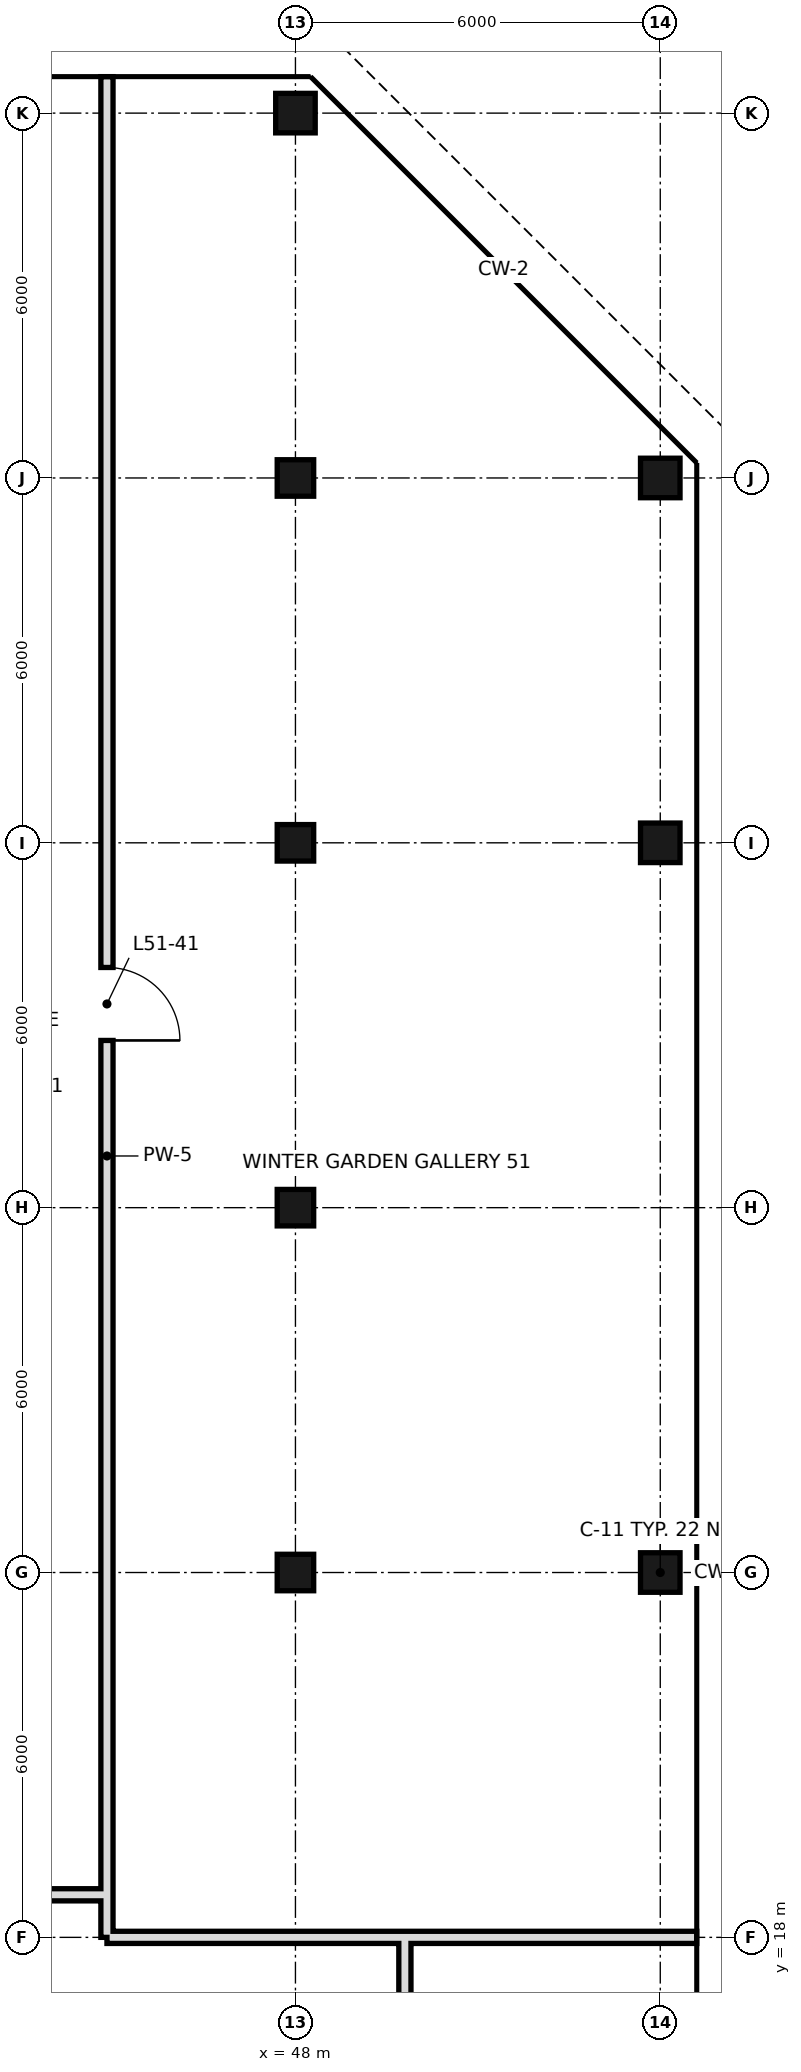
"""IFC4 building model, lengths in metres.
Left out: names, types, materials, properties, quantities, classifications, styles, units other than length and angle.
Written with IfcOpenShell. Run it as: python <this file> out.ifc"""

import sys

from ifc_helpers import new_model, si_unit, direction, frame, frame_2d, origin, origin_2d, place, context, subcontext, project, spatial, rectangle, hollow_rectangle, extrude, element, fill, save


model = new_model("IFC4")
c1 = context("Model", 3, precision=1e-05, world=origin(), true_north=direction((0.0, 1.0)))
c2 = subcontext(c1, "Body", "Model", "MODEL_VIEW")
j1 = project(units=[si_unit("LENGTHUNIT", "METRE"), si_unit("PLANEANGLEUNIT", "RADIAN")], contexts=[c1])
p1 = place(None, origin())
s1 = spatial("IfcSite", under=j1, at=p1, CompositionType="ELEMENT")
p2 = place(p1, origin())
s2 = spatial("IfcBuilding", under=s1, at=p2, CompositionType="ELEMENT")
p3 = place(p2, frame((0.0, 0.0, 219.0)))
s3 = spatial("IfcBuildingStorey", under=s2, at=p3, CompositionType="ELEMENT", Elevation=219.0)
for number, where, z_axis, x_axis in (
    (1, (48.0, 24.0, 0.0), (0.0, 0.0, 1.0), (1.0, 0.0, 0.0)),
    (2, (48.0, 30.0, 0.0), (0.0, 0.0, 1.0), (1.0, 0.0, 0.0)),
    (3, (48.0, 36.0, 0.0), (0.0, 0.0, 1.0), (1.0, 0.0, 0.0)),
    (4, (48.0, 42.0, 0.0), (0.0, 0.0, 1.0), (1.0, 0.0, 0.0)),
):
    element("IfcColumn", number, at=place(p3, frame(where, z_axis=z_axis, x_axis=x_axis)), inside=s3, PredefinedType="COLUMN", context=c2, shape_type="SweptSolid", body=[
        extrude(hollow_rectangle(XDim=0.6, YDim=0.6, WallThickness=0.028, at=origin_2d()), origin(), (0.0, 0.0, 1.0), 3.6),
    ])
for number, where, z_axis, x_axis in (
    (5, (48.0, 48.0, 0.0), (0.0, 0.0, 1.0), (1.0, 0.0, 0.0)),
    (6, (54.0, 24.0, 0.0), (0.0, 0.0, 1.0), (1.0, 0.0, 0.0)),
    (7, (54.0, 36.0, 0.0), (0.0, 0.0, 1.0), (1.0, 0.0, 0.0)),
    (8, (54.0, 42.0, 0.0), (0.0, 0.0, 1.0), (1.0, 0.0, 0.0)),
):
    element("IfcColumn", number, at=place(p3, frame(where, z_axis=z_axis, x_axis=x_axis)), inside=s3, PredefinedType="COLUMN", context=c2, shape_type="SweptSolid", body=[
        extrude(hollow_rectangle(XDim=0.65, YDim=0.65, WallThickness=0.032, at=origin_2d()), origin(), (0.0, 0.0, 1.0), 3.6),
    ])
p4 = place(p3, frame((44.9, 18.0, 0.0), z_axis=(0.0, 0.0, 1.0), x_axis=(0.0, 1.0, 0.0)))
e9 = element("IfcWall", 9, at=p4, inside=s3, PredefinedType="SOLIDWALL", context=c2, shape_type="SweptSolid", body=[
    extrude(rectangle(XDim=30.6, YDim=0.2, at=frame_2d((15.3, 0.0))), origin(), (0.0, 0.0, 1.0), 2.72),
])
p5 = place(p4, frame((14.75, 0.0, 0.0)))
e10 = element("IfcOpeningElement", 10, at=p5, cuts=e9, PredefinedType="OPENING", context=c2, shape_type="SweptSolid", body=[
    extrude(rectangle(XDim=1.2, YDim=2.4, at=frame_2d((0.6, 1.2))), frame((0.0, 0.11, 0.0), z_axis=(0.0, -1.0, 0.0), x_axis=(1.0, 0.0, 0.0)), (0.0, 0.0, 1.0), 0.22),
])
p6 = place(p3, frame((49.8, 10.8, 0.0), z_axis=(0.0, 0.0, 1.0), x_axis=(0.0, 1.0, 0.0)))
e11 = element("IfcWall", 11, at=p6, inside=s3, PredefinedType="SOLIDWALL", context=c2, shape_type="SweptSolid", body=[
    extrude(rectangle(XDim=7.2, YDim=0.2, at=frame_2d((3.6, 0.0))), origin(), (0.0, 0.0, 1.0), 2.97),
])
p7 = place(p3, frame((44.9, 18.0, 0.0), z_axis=(0.0, 0.0, 1.0), x_axis=(1.0, 0.0, 0.0)))
e12 = element("IfcWall", 12, at=p7, inside=s3, PredefinedType="SOLIDWALL", context=c2, shape_type="SweptSolid", body=[
    extrude(rectangle(XDim=4.9, YDim=0.2, at=frame_2d((2.45, 0.0))), origin(), (0.0, 0.0, 1.0), 2.72),
])
p8 = place(p3, frame((49.8, 18.0, 0.0), z_axis=(0.0, 0.0, 1.0), x_axis=(1.0, 0.0, 0.0)))
e13 = element("IfcWall", 13, at=p8, inside=s3, PredefinedType="SOLIDWALL", context=c2, shape_type="SweptSolid", body=[
    extrude(rectangle(XDim=4.8, YDim=0.2, at=frame_2d((2.4, 0.0))), origin(), (0.0, 0.0, 1.0), 2.72),
])
p9 = place(p3, frame((7.2, 18.7, 0.0), z_axis=(0.0, 0.0, 1.0), x_axis=(1.0, 0.0, 0.0)))
e14 = element("IfcWall", 14, at=p9, inside=s3, PredefinedType="SOLIDWALL", context=c2, shape_type="SweptSolid", body=[
    extrude(rectangle(XDim=37.7, YDim=0.2, at=frame_2d((18.85, 0.0))), origin(), (0.0, 0.0, 1.0), 2.72),
])
p10 = place(p9, frame((1.54, 0.0, 0.0)))
e15 = element("IfcOpeningElement", 15, at=p10, cuts=e14, PredefinedType="OPENING", context=c2, shape_type="SweptSolid", body=[
    extrude(rectangle(XDim=1.2, YDim=2.4, at=frame_2d((0.6, 1.2))), frame((0.0, 0.11, 0.0), z_axis=(0.0, -1.0, 0.0), x_axis=(1.0, 0.0, 0.0)), (0.0, 0.0, 1.0), 0.22),
])
p11 = place(p9, frame((30.26, 0.0, 0.0)))
e16 = element("IfcOpeningElement", 16, at=p11, cuts=e14, PredefinedType="OPENING", context=c2, shape_type="SweptSolid", body=[
    extrude(rectangle(XDim=1.2, YDim=2.4, at=frame_2d((0.6, 1.2))), frame((0.0, 0.11, 0.0), z_axis=(0.0, -1.0, 0.0), x_axis=(1.0, 0.0, 0.0)), (0.0, 0.0, 1.0), 0.22),
])
p12 = place(p5, frame((1.2, 0.0, 0.0), z_axis=(0.0, 0.0, 1.0), x_axis=(-1.0, 0.0, 0.0)))
e17 = element("IfcDoor", 17, at=p12, inside=s3, OperationType="SINGLE_SWING_RIGHT", PredefinedType="DOOR", context=c2, shape_type="SweptSolid", body=[
    extrude(rectangle(XDim=1.2, YDim=2.4, at=frame_2d((0.6, 1.2))), frame((0.0, 0.025, 0.0), z_axis=(0.0, -1.0, 0.0), x_axis=(1.0, 0.0, 0.0)), (0.0, 0.0, 1.0), 0.05),
])
fill(e10, e17)
save(model, sys.argv[1])
